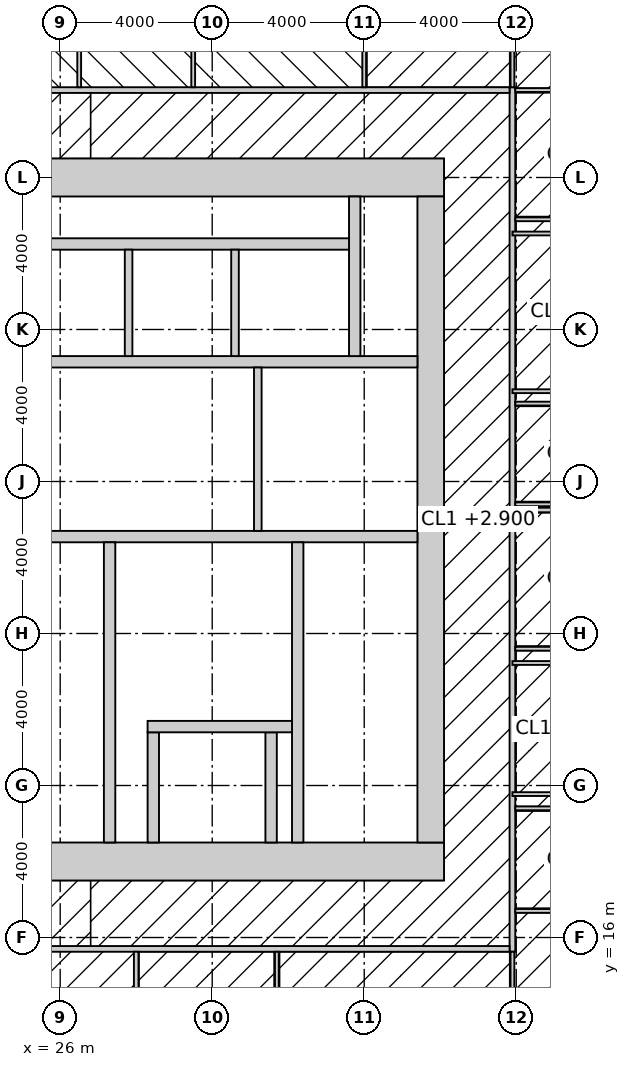
"""IFC4 building model, lengths in metres.
Left out: names, types, materials, properties, quantities, classifications, styles, units other than length and angle.
Written with IfcOpenShell. Run it as: python <this file> out.ifc"""

import sys

from ifc_helpers import new_model, si_unit, direction, frame, frame_2d, origin, place, context, subcontext, project, spatial, rectangle, extrude, element, fill, save


model = new_model("IFC4")
c1 = context("Model", 3, precision=1e-05, world=origin(), true_north=direction((0.0, 1.0)))
c2 = subcontext(c1, "Body", "Model", "MODEL_VIEW")
j1 = project(units=[si_unit("LENGTHUNIT", "METRE"), si_unit("PLANEANGLEUNIT", "RADIAN")], contexts=[c1])
p1 = place(None, origin())
s1 = spatial("IfcSite", under=j1, at=p1, CompositionType="ELEMENT")
p2 = place(p1, origin())
s2 = spatial("IfcBuilding", under=s1, at=p2, CompositionType="ELEMENT")
p3 = place(p2, frame((0.0, 0.0, 121.4)))
s3 = spatial("IfcBuildingStorey", under=s2, at=p3, CompositionType="ELEMENT", Elevation=121.4)
p4 = place(p3, frame((18.5, 18.0, -0.15), z_axis=(0.0, 0.0, 1.0), x_axis=(1.0, 0.0, 0.0)))
e1 = element("IfcWall", 1, at=p4, inside=s3, PredefinedType="SHEAR", context=c2, shape_type="SweptSolid", body=[
    extrude(rectangle(XDim=17.6, YDim=1.0, at=frame_2d((8.8, 0.0))), origin(), (0.0, 0.0, 1.0), 4.0),
])
p5 = place(p4, frame((3.45, 0.0, 0.15)))
e2 = element("IfcOpeningElement", 2, at=p5, cuts=e1, PredefinedType="OPENING", context=c2, shape_type="SweptSolid", body=[
    extrude(rectangle(XDim=1.5, YDim=2.4, at=frame_2d((0.75, 1.2))), frame((0.0, 0.51, 0.0), z_axis=(0.0, -1.0, 0.0), x_axis=(1.0, 0.0, 0.0)), (0.0, 0.0, 1.0), 1.02),
])
p6 = place(p3, frame((18.5, 36.0, -0.15), z_axis=(0.0, 0.0, 1.0), x_axis=(1.0, 0.0, 0.0)))
e3 = element("IfcWall", 3, at=p6, inside=s3, PredefinedType="SHEAR", context=c2, shape_type="SweptSolid", body=[
    extrude(rectangle(XDim=17.6, YDim=1.0, at=frame_2d((8.8, 0.0))), origin(), (0.0, 0.0, 1.0), 4.0),
])
p7 = place(p3, frame((35.75, 18.5, -0.15), z_axis=(0.0, 0.0, 1.0), x_axis=(0.0, 1.0, 0.0)))
e4 = element("IfcWall", 4, at=p7, inside=s3, PredefinedType="SHEAR", context=c2, shape_type="SweptSolid", body=[
    extrude(rectangle(XDim=17.0, YDim=0.7, at=frame_2d((8.5, 0.0))), origin(), (0.0, 0.0, 1.0), 4.0),
])
p8 = place(p7, frame((9.85, 0.0, 0.15)))
e5 = element("IfcOpeningElement", 5, at=p8, cuts=e4, PredefinedType="OPENING", context=c2, shape_type="SweptSolid", body=[
    extrude(rectangle(XDim=1.0, YDim=2.2, at=frame_2d((0.5, 1.1))), frame((0.0, 0.36, 0.0), z_axis=(0.0, -1.0, 0.0), x_axis=(1.0, 0.0, 0.0)), (0.0, 0.0, 1.0), 0.72),
])
p9 = place(p3, frame((24.15, 26.55, -0.15), z_axis=(0.0, 0.0, 1.0), x_axis=(1.0, 0.0, 0.0)))
e6 = element("IfcWall", 6, at=p9, inside=s3, PredefinedType="SHEAR", context=c2, shape_type="SweptSolid", body=[
    extrude(rectangle(XDim=11.25, YDim=0.3, at=frame_2d((5.625, 0.0))), origin(), (0.0, 0.0, 1.0), 4.0),
])
p10 = place(p9, frame((9.25, 0.0, 0.15)))
e7 = element("IfcOpeningElement", 7, at=p10, cuts=e6, PredefinedType="OPENING", context=c2, shape_type="SweptSolid", body=[
    extrude(rectangle(XDim=1.0, YDim=2.2, at=frame_2d((0.5, 1.1))), frame((0.0, 0.16, 0.0), z_axis=(0.0, -1.0, 0.0), x_axis=(1.0, 0.0, 0.0)), (0.0, 0.0, 1.0), 0.32),
])
p11 = place(p9, frame((4.9, 0.0, 0.15)))
e8 = element("IfcOpeningElement", 8, at=p11, cuts=e6, PredefinedType="OPENING", context=c2, shape_type="SweptSolid", body=[
    extrude(rectangle(XDim=1.5, YDim=2.4, at=frame_2d((0.75, 1.2))), frame((0.0, 0.16, 0.0), z_axis=(0.0, -1.0, 0.0), x_axis=(1.0, 0.0, 0.0)), (0.0, 0.0, 1.0), 0.32),
])
p12 = place(p3, frame((27.3, 18.5, -0.15), z_axis=(0.0, 0.0, 1.0), x_axis=(0.0, 1.0, 0.0)))
e9 = element("IfcWall", 9, at=p12, inside=s3, PredefinedType="SHEAR", context=c2, shape_type="SweptSolid", body=[
    extrude(rectangle(XDim=7.9, YDim=0.3, at=frame_2d((3.95, 0.0))), origin(), (0.0, 0.0, 1.0), 4.0),
])
p13 = place(p12, frame((6.4, 0.0, 0.15)))
e10 = element("IfcOpeningElement", 10, at=p13, cuts=e9, PredefinedType="OPENING", context=c2, shape_type="SweptSolid", body=[
    extrude(rectangle(XDim=1.0, YDim=2.2, at=frame_2d((0.5, 1.1))), frame((0.0, 0.16, 0.0), z_axis=(0.0, -1.0, 0.0), x_axis=(1.0, 0.0, 0.0)), (0.0, 0.0, 1.0), 0.32),
])
p14 = place(p3, frame((32.25, 18.5, -0.15), z_axis=(0.0, 0.0, 1.0), x_axis=(0.0, 1.0, 0.0)))
e11 = element("IfcWall", 11, at=p14, inside=s3, PredefinedType="SHEAR", context=c2, shape_type="SweptSolid", body=[
    extrude(rectangle(XDim=7.9, YDim=0.3, at=frame_2d((3.95, 0.0))), origin(), (0.0, 0.0, 1.0), 4.0),
])
for number, where, z_axis, x_axis in (
    (12, (28.45, 18.5, -0.15), (0.0, 0.0, 1.0), (0.0, 1.0, 0.0)),
    (13, (31.55, 18.5, -0.15), (0.0, 0.0, 1.0), (0.0, 1.0, 0.0)),
):
    element("IfcWall", number, at=place(p3, frame(where, z_axis=z_axis, x_axis=x_axis)), inside=s3, PredefinedType="SHEAR", context=c2, shape_type="SweptSolid", body=[
        extrude(rectangle(XDim=2.9, YDim=0.3, at=frame_2d((1.45, 0.0))), origin(), (0.0, 0.0, 1.0), 4.0),
    ])
p15 = place(p3, frame((28.3, 21.55, -0.15), z_axis=(0.0, 0.0, 1.0), x_axis=(1.0, 0.0, 0.0)))
e14 = element("IfcWall", 14, at=p15, inside=s3, PredefinedType="SHEAR", context=c2, shape_type="SweptSolid", body=[
    extrude(rectangle(XDim=3.8, YDim=0.3, at=frame_2d((1.9, 0.0))), origin(), (0.0, 0.0, 1.0), 4.0),
])
p16 = place(p15, frame((1.05, 0.0, 0.15)))
e15 = element("IfcOpeningElement", 15, at=p16, cuts=e14, PredefinedType="OPENING", context=c2, shape_type="SweptSolid", body=[
    extrude(rectangle(XDim=1.3, YDim=2.4, at=frame_2d((0.65, 1.2))), frame((0.0, 0.16, 0.0), z_axis=(0.0, -1.0, 0.0), x_axis=(1.0, 0.0, 0.0)), (0.0, 0.0, 1.0), 0.32),
])
p17 = place(p3, frame((24.15, 31.15, -0.15), z_axis=(0.0, 0.0, 1.0), x_axis=(1.0, 0.0, 0.0)))
e16 = element("IfcWall", 16, at=p17, inside=s3, PredefinedType="SHEAR", context=c2, shape_type="SweptSolid", body=[
    extrude(rectangle(XDim=11.25, YDim=0.3, at=frame_2d((5.625, 0.0))), origin(), (0.0, 0.0, 1.0), 4.0),
])
p18 = place(p17, frame((7.25, 0.0, 0.15)))
e17 = element("IfcOpeningElement", 17, at=p18, cuts=e16, PredefinedType="OPENING", context=c2, shape_type="SweptSolid", body=[
    extrude(rectangle(XDim=1.4, YDim=2.4, at=frame_2d((0.7, 1.2))), frame((0.0, 0.16, 0.0), z_axis=(0.0, -1.0, 0.0), x_axis=(1.0, 0.0, 0.0)), (0.0, 0.0, 1.0), 0.32),
])
p19 = place(p3, frame((33.75, 31.3, -0.15), z_axis=(0.0, 0.0, 1.0), x_axis=(0.0, 1.0, 0.0)))
e18 = element("IfcWall", 18, at=p19, inside=s3, PredefinedType="SHEAR", context=c2, shape_type="SweptSolid", body=[
    extrude(rectangle(XDim=4.2, YDim=0.3, at=frame_2d((2.1, 0.0))), origin(), (0.0, 0.0, 1.0), 4.0),
])
p20 = place(p3, frame((25.0, 34.25, -0.15), z_axis=(0.0, 0.0, 1.0), x_axis=(1.0, 0.0, 0.0)))
e19 = element("IfcWall", 19, at=p20, inside=s3, PredefinedType="SHEAR", context=c2, shape_type="SweptSolid", body=[
    extrude(rectangle(XDim=8.6, YDim=0.3, at=frame_2d((4.3, 0.0))), origin(), (0.0, 0.0, 1.0), 4.0),
])
for number, where, z_axis, x_axis in (
    (20, (27.8, 31.3, -0.15), (0.0, 0.0, 1.0), (0.0, 1.0, 0.0)),
    (21, (30.6, 31.3, -0.15), (0.0, 0.0, 1.0), (0.0, 1.0, 0.0)),
):
    element("IfcWall", number, at=place(p3, frame(where, z_axis=z_axis, x_axis=x_axis)), inside=s3, PredefinedType="SOLIDWALL", context=c2, shape_type="SweptSolid", body=[
        extrude(rectangle(XDim=2.8, YDim=0.2, at=frame_2d((1.4, 0.0))), origin(), (0.0, 0.0, 1.0), 4.0),
    ])
p21 = place(p3, frame((31.2, 26.7, 0.0), z_axis=(0.0, 0.0, 1.0), x_axis=(0.0, 1.0, 0.0)))
e22 = element("IfcWall", 22, at=p21, inside=s3, PredefinedType="SOLIDWALL", context=c2, shape_type="SweptSolid", body=[
    extrude(rectangle(XDim=4.3, YDim=0.2, at=frame_2d((2.15, 0.0))), origin(), (0.0, 0.0, 1.0), 3.85),
])
p22 = place(p3, frame((37.9, 15.625, 0.0), z_axis=(0.0, 0.0, 1.0), x_axis=(0.0, 1.0, 0.0)))
e23 = element("IfcWall", 23, at=p22, inside=s3, PredefinedType="PARTITIONING", context=c2, shape_type="SweptSolid", body=[
    extrude(rectangle(XDim=22.75, YDim=0.15, at=frame_2d((11.375, 0.0))), origin(), (0.0, 0.0, 1.0), 2.95),
])
p23 = place(p22, frame((4.974, 0.0, 0.0)))
e24 = element("IfcOpeningElement", 24, at=p23, cuts=e23, PredefinedType="OPENING", context=c2, shape_type="SweptSolid", body=[
    extrude(rectangle(XDim=1.8, YDim=2.4, at=frame_2d((0.9, 1.2))), frame((0.0, 0.085, 0.0), z_axis=(0.0, -1.0, 0.0), x_axis=(1.0, 0.0, 0.0)), (0.0, 0.0, 1.0), 0.17),
])
p24 = place(p22, frame((16.226, 0.0, 0.0)))
e25 = element("IfcOpeningElement", 25, at=p24, cuts=e23, PredefinedType="OPENING", context=c2, shape_type="SweptSolid", body=[
    extrude(rectangle(XDim=1.8, YDim=2.4, at=frame_2d((0.9, 1.2))), frame((0.0, 0.085, 0.0), z_axis=(0.0, -1.0, 0.0), x_axis=(1.0, 0.0, 0.0)), (0.0, 0.0, 1.0), 0.17),
])
p25 = place(p3, frame((15.775, 15.7, 0.0), z_axis=(0.0, 0.0, 1.0), x_axis=(1.0, 0.0, 0.0)))
e26 = element("IfcWall", 26, at=p25, inside=s3, PredefinedType="PARTITIONING", context=c2, shape_type="SweptSolid", body=[
    extrude(rectangle(XDim=22.05, YDim=0.15, at=frame_2d((11.025, 0.0))), origin(), (0.0, 0.0, 1.0), 3.85),
])
p26 = place(p3, frame((15.775, 38.3, 0.0), z_axis=(0.0, 0.0, 1.0), x_axis=(1.0, 0.0, 0.0)))
e27 = element("IfcWall", 27, at=p26, inside=s3, PredefinedType="PARTITIONING", context=c2, shape_type="SweptSolid", body=[
    extrude(rectangle(XDim=22.05, YDim=0.15, at=frame_2d((11.025, 0.0))), origin(), (0.0, 0.0, 1.0), 3.85),
])
p27 = place(p26, frame((7.975, 0.0, 0.0)))
e28 = element("IfcOpeningElement", 28, at=p27, cuts=e27, PredefinedType="OPENING", context=c2, shape_type="SweptSolid", body=[
    extrude(rectangle(XDim=0.9, YDim=2.1, at=frame_2d((0.45, 1.05))), frame((0.0, 0.085, 0.0), z_axis=(0.0, -1.0, 0.0), x_axis=(1.0, 0.0, 0.0)), (0.0, 0.0, 1.0), 0.17),
])
p28 = place(p26, frame((11.725, 0.0, 0.0)))
e29 = element("IfcOpeningElement", 29, at=p28, cuts=e27, PredefinedType="OPENING", context=c2, shape_type="SweptSolid", body=[
    extrude(rectangle(XDim=1.0, YDim=2.1, at=frame_2d((0.5, 1.05))), frame((0.0, 0.085, 0.0), z_axis=(0.0, -1.0, 0.0), x_axis=(1.0, 0.0, 0.0)), (0.0, 0.0, 1.0), 0.17),
])
p29 = place(p26, frame((15.575, 0.0, 0.0)))
e30 = element("IfcOpeningElement", 30, at=p29, cuts=e27, PredefinedType="OPENING", context=c2, shape_type="SweptSolid", body=[
    extrude(rectangle(XDim=0.9, YDim=2.1, at=frame_2d((0.45, 1.05))), frame((0.0, 0.085, 0.0), z_axis=(0.0, -1.0, 0.0), x_axis=(1.0, 0.0, 0.0)), (0.0, 0.0, 1.0), 0.17),
])
p30 = place(p3, frame((34.0, 38.375, 0.0), z_axis=(0.0, 0.0, 1.0), x_axis=(0.0, 1.0, 0.0)))
e31 = element("IfcWall", 31, at=p30, inside=s3, PredefinedType="PARTITIONING", context=c2, shape_type="SweptSolid", body=[
    extrude(rectangle(XDim=3.675, YDim=0.1, at=frame_2d((1.837, 0.0))), origin(), (0.0, 0.0, 1.0), 2.95),
])
for number, where, z_axis, x_axis in (
    (32, (26.5, 38.375, 0.0), (0.0, 0.0, 1.0), (0.0, 1.0, 0.0)),
    (33, (29.5, 38.375, 0.0), (0.0, 0.0, 1.0), (0.0, 1.0, 0.0)),
):
    element("IfcWall", number, at=place(p3, frame(where, z_axis=z_axis, x_axis=x_axis)), inside=s3, PredefinedType="PARTITIONING", context=c2, shape_type="SweptSolid", body=[
        extrude(rectangle(XDim=3.575, YDim=0.1, at=frame_2d((1.788, 0.0))), origin(), (0.0, 0.0, 1.0), 3.85),
    ])
p31 = place(p3, frame((28.0, 4.3, 0.0), z_axis=(0.0, 0.0, 1.0), x_axis=(0.0, 1.0, 0.0)))
e34 = element("IfcWall", 34, at=p31, inside=s3, PredefinedType="PARTITIONING", context=c2, shape_type="SweptSolid", body=[
    extrude(rectangle(XDim=11.325, YDim=0.12, at=frame_2d((5.663, 0.0))), origin(), (0.0, 0.0, 1.0), 3.85),
])
p32 = place(p3, frame((37.975, 27.25, 0.0), z_axis=(0.0, 0.0, 1.0), x_axis=(1.0, 0.0, 0.0)))
e35 = element("IfcWall", 35, at=p32, inside=s3, PredefinedType="PARTITIONING", context=c2, shape_type="SweptSolid", body=[
    extrude(rectangle(XDim=19.725, YDim=0.12, at=frame_2d((9.862, 0.0))), origin(), (0.0, 0.0, 1.0), 3.85),
])
for number, where, z_axis, x_axis in (
    (36, (37.975, 16.7, 0.0), (0.0, 0.0, 1.0), (1.0, 0.0, 0.0)),
    (37, (37.975, 19.399, 0.0), (0.0, 0.0, 1.0), (1.0, 0.0, 0.0)),
):
    element("IfcWall", number, at=place(p3, frame(where, z_axis=z_axis, x_axis=x_axis)), inside=s3, PredefinedType="PARTITIONING", context=c2, shape_type="SweptSolid", body=[
        extrude(rectangle(XDim=4.775, YDim=0.1, at=frame_2d((2.387, 0.0))), origin(), (0.0, 0.0, 1.0), 3.85),
    ])
p33 = place(p3, frame((37.975, 23.599, 0.0), z_axis=(0.0, 0.0, 1.0), x_axis=(1.0, 0.0, 0.0)))
e38 = element("IfcWall", 38, at=p33, inside=s3, PredefinedType="PARTITIONING", context=c2, shape_type="SweptSolid", body=[
    extrude(rectangle(XDim=4.775, YDim=0.1, at=frame_2d((2.387, 0.0))), origin(), (0.0, 0.0, 1.0), 2.95),
])
for number, where, z_axis, x_axis in (
    (39, (37.975, 27.4, 0.0), (0.0, 0.0, 1.0), (1.0, 0.0, 0.0)),
    (40, (37.975, 30.05, 0.0), (0.0, 0.0, 1.0), (1.0, 0.0, 0.0)),
    (41, (37.975, 34.9, 0.0), (0.0, 0.0, 1.0), (1.0, 0.0, 0.0)),
    (42, (37.975, 38.3, 0.0), (0.0, 0.0, 1.0), (1.0, 0.0, 0.0)),
):
    element("IfcWall", number, at=place(p3, frame(where, z_axis=z_axis, x_axis=x_axis)), inside=s3, PredefinedType="PARTITIONING", context=c2, shape_type="SweptSolid", body=[
        extrude(rectangle(XDim=4.775, YDim=0.1, at=frame_2d((2.387, 0.0))), origin(), (0.0, 0.0, 1.0), 3.85),
    ])
p34 = place(p3, frame((31.701, 11.55, 0.0), z_axis=(0.0, 0.0, 1.0), x_axis=(0.0, 1.0, 0.0)))
e43 = element("IfcWall", 43, at=p34, inside=s3, PredefinedType="PARTITIONING", context=c2, shape_type="SweptSolid", body=[
    extrude(rectangle(XDim=4.075, YDim=0.1, at=frame_2d((2.038, 0.0))), origin(), (0.0, 0.0, 1.0), 3.85),
])
p35 = place(p3, frame((37.9, 11.55, 0.0), z_axis=(0.0, 0.0, 1.0), x_axis=(0.0, 1.0, 0.0)))
e44 = element("IfcWall", 44, at=p35, inside=s3, PredefinedType="PARTITIONING", context=c2, shape_type="SweptSolid", body=[
    extrude(rectangle(XDim=4.075, YDim=0.1, at=frame_2d((2.038, 0.0))), origin(), (0.0, 0.0, 1.0), 2.95),
])
p36 = place(p3, frame((37.9, 38.375, 0.0), z_axis=(0.0, 0.0, 1.0), x_axis=(0.0, 1.0, 0.0)))
e45 = element("IfcWall", 45, at=p36, inside=s3, PredefinedType="PARTITIONING", context=c2, shape_type="SweptSolid", body=[
    extrude(rectangle(XDim=3.475, YDim=0.1, at=frame_2d((1.738, 0.0))), origin(), (0.0, 0.0, 1.0), 2.95),
])
p37 = place(p3, frame((37.9, 19.774, 0.0), z_axis=(0.0, 0.0, 1.0), x_axis=(1.0, 0.0, 0.0)))
e46 = element("IfcWall", 46, at=p37, inside=s3, PredefinedType="PARTITIONING", context=c2, shape_type="SweptSolid", body=[
    extrude(rectangle(XDim=3.15, YDim=0.1, at=frame_2d((1.575, 0.0))), origin(), (0.0, 0.0, 1.0), 2.95),
])
p38 = place(p3, frame((41.05, 23.224, 0.0), z_axis=(0.0, 0.0, 1.0), x_axis=(-1.0, 0.0, 0.0)))
e47 = element("IfcWall", 47, at=p38, inside=s3, PredefinedType="PARTITIONING", context=c2, shape_type="SweptSolid", body=[
    extrude(rectangle(XDim=3.15, YDim=0.1, at=frame_2d((1.575, 0.0))), origin(), (0.0, 0.0, 1.0), 3.85),
])
for number, where, z_axis, x_axis in (
    (48, (37.9, 30.376, 0.0), (0.0, 0.0, 1.0), (1.0, 0.0, 0.0)),
    (49, (41.85, 34.526, 0.0), (0.0, 0.0, 1.0), (-1.0, 0.0, 0.0)),
):
    element("IfcWall", number, at=place(p3, frame(where, z_axis=z_axis, x_axis=x_axis)), inside=s3, PredefinedType="PARTITIONING", context=c2, shape_type="SweptSolid", body=[
        extrude(rectangle(XDim=3.95, YDim=0.1, at=frame_2d((1.975, 0.0))), origin(), (0.0, 0.0, 1.0), 3.85),
    ])
p39 = place(p13, origin())
e50 = element("IfcDoor", 50, at=p39, inside=s3, OperationType="SINGLE_SWING_RIGHT", PredefinedType="DOOR", context=c2, shape_type="SweptSolid", body=[
    extrude(rectangle(XDim=1.0, YDim=2.2, at=frame_2d((0.5, 1.1))), frame((0.0, 0.025, 0.0), z_axis=(0.0, -1.0, 0.0), x_axis=(1.0, 0.0, 0.0)), (0.0, 0.0, 1.0), 0.05),
])
fill(e10, e50)
p40 = place(p10, frame((1.0, 0.0, 0.0), z_axis=(0.0, 0.0, 1.0), x_axis=(-1.0, 0.0, 0.0)))
e51 = element("IfcDoor", 51, at=p40, inside=s3, OperationType="SINGLE_SWING_RIGHT", PredefinedType="DOOR", context=c2, shape_type="SweptSolid", body=[
    extrude(rectangle(XDim=1.0, YDim=2.2, at=frame_2d((0.5, 1.1))), frame((0.0, 0.025, 0.0), z_axis=(0.0, -1.0, 0.0), x_axis=(1.0, 0.0, 0.0)), (0.0, 0.0, 1.0), 0.05),
])
fill(e7, e51)
p41 = place(p8, origin())
e52 = element("IfcDoor", 52, at=p41, inside=s3, OperationType="SINGLE_SWING_RIGHT", PredefinedType="DOOR", context=c2, shape_type="SweptSolid", body=[
    extrude(rectangle(XDim=1.0, YDim=2.2, at=frame_2d((0.5, 1.1))), frame((0.0, 0.025, 0.0), z_axis=(0.0, -1.0, 0.0), x_axis=(1.0, 0.0, 0.0)), (0.0, 0.0, 1.0), 0.05),
])
fill(e5, e52)
p42 = place(p11, origin())
e53 = element("IfcDoor", 53, at=p42, inside=s3, OperationType="DOUBLE_DOOR_DOUBLE_SWING", PredefinedType="DOOR", context=c2, shape_type="SweptSolid", body=[
    extrude(rectangle(XDim=1.5, YDim=2.4, at=frame_2d((0.75, 1.2))), frame((0.0, 0.025, 0.0), z_axis=(0.0, -1.0, 0.0), x_axis=(1.0, 0.0, 0.0)), (0.0, 0.0, 1.0), 0.05),
])
fill(e8, e53)
p43 = place(p28, origin())
e54 = element("IfcDoor", 54, at=p43, inside=s3, OperationType="SLIDING_TO_LEFT", PredefinedType="DOOR", context=c2, shape_type="SweptSolid", body=[
    extrude(rectangle(XDim=1.0, YDim=2.1, at=frame_2d((0.5, 1.05))), frame((0.0, 0.025, 0.0), z_axis=(0.0, -1.0, 0.0), x_axis=(1.0, 0.0, 0.0)), (0.0, 0.0, 1.0), 0.05),
])
fill(e29, e54)
p44 = place(p29, origin())
e55 = element("IfcDoor", 55, at=p44, inside=s3, OperationType="SINGLE_SWING_LEFT", PredefinedType="DOOR", context=c2, shape_type="SweptSolid", body=[
    extrude(rectangle(XDim=0.9, YDim=2.1, at=frame_2d((0.45, 1.05))), frame((0.0, 0.025, 0.0), z_axis=(0.0, -1.0, 0.0), x_axis=(1.0, 0.0, 0.0)), (0.0, 0.0, 1.0), 0.05),
])
fill(e30, e55)
p45 = place(p23, origin())
e56 = element("IfcDoor", 56, at=p45, inside=s3, OperationType="DOUBLE_DOOR_DOUBLE_SWING", PredefinedType="DOOR", context=c2, shape_type="SweptSolid", body=[
    extrude(rectangle(XDim=1.8, YDim=2.4, at=frame_2d((0.9, 1.2))), frame((0.0, 0.025, 0.0), z_axis=(0.0, -1.0, 0.0), x_axis=(1.0, 0.0, 0.0)), (0.0, 0.0, 1.0), 0.05),
])
fill(e24, e56)
p46 = place(p24, origin())
e57 = element("IfcDoor", 57, at=p46, inside=s3, OperationType="DOUBLE_DOOR_DOUBLE_SWING", PredefinedType="DOOR", context=c2, shape_type="SweptSolid", body=[
    extrude(rectangle(XDim=1.8, YDim=2.4, at=frame_2d((0.9, 1.2))), frame((0.0, 0.025, 0.0), z_axis=(0.0, -1.0, 0.0), x_axis=(1.0, 0.0, 0.0)), (0.0, 0.0, 1.0), 0.05),
])
fill(e25, e57)
p47 = place(p16, origin())
e58 = element("IfcDoor", 58, at=p47, inside=s3, OperationType="DOUBLE_DOOR_SLIDING", PredefinedType="DOOR", context=c2, shape_type="SweptSolid", body=[
    extrude(rectangle(XDim=1.3, YDim=2.4, at=frame_2d((0.65, 1.2))), frame((0.0, 0.025, 0.0), z_axis=(0.0, -1.0, 0.0), x_axis=(1.0, 0.0, 0.0)), (0.0, 0.0, 1.0), 0.05),
])
fill(e15, e58)
p48 = place(p18, origin())
e59 = element("IfcDoor", 59, at=p48, inside=s3, OperationType="DOUBLE_DOOR_SLIDING", PredefinedType="DOOR", context=c2, shape_type="SweptSolid", body=[
    extrude(rectangle(XDim=1.4, YDim=2.4, at=frame_2d((0.7, 1.2))), frame((0.0, 0.025, 0.0), z_axis=(0.0, -1.0, 0.0), x_axis=(1.0, 0.0, 0.0)), (0.0, 0.0, 1.0), 0.05),
])
fill(e17, e59)
save(model, sys.argv[1])
